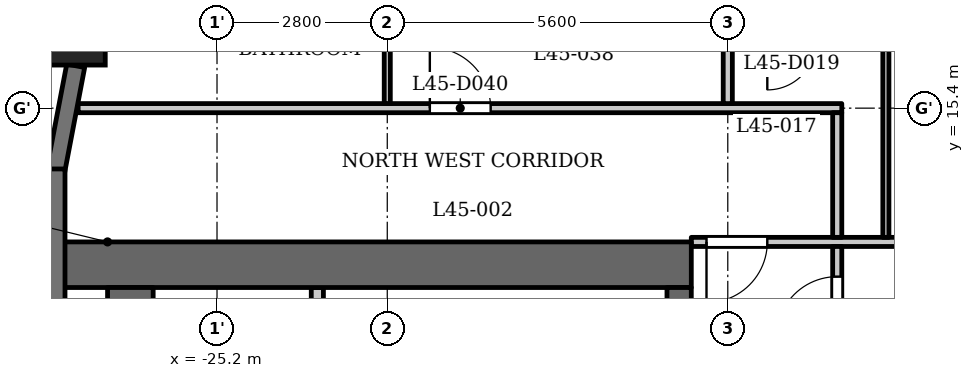
"""IFC4 building model, lengths in metres.
Left out: names, types, materials, properties, quantities, classifications, styles, units other than length and angle.
Written with IfcOpenShell. Run it as: python <this file> out.ifc"""

import sys

from ifc_helpers import new_model, si_unit, direction, frame, frame_2d, origin, origin_2d, place, context, subcontext, project, spatial, rectangle, extrude, element, fill, save


model = new_model("IFC4")
c1 = context("Model", 3, precision=1e-05, world=origin(), true_north=direction((0.0, 1.0)))
c2 = subcontext(c1, "Body", "Model", "MODEL_VIEW")
j1 = project(units=[si_unit("LENGTHUNIT", "METRE"), si_unit("PLANEANGLEUNIT", "RADIAN")], contexts=[c1])
p1 = place(None, origin())
s1 = spatial("IfcSite", under=j1, at=p1, CompositionType="ELEMENT")
p2 = place(p1, origin())
s2 = spatial("IfcBuilding", under=s1, at=p2, CompositionType="ELEMENT")
p3 = place(p2, frame((0.0, 0.0, 174.6)))
s3 = spatial("IfcBuildingStorey", under=s2, at=p3, CompositionType="ELEMENT", Elevation=174.6)
p4 = place(p3, frame((-27.538, 16.609, 0.0), z_axis=(0.0, 0.0, 1.0), x_axis=(1.0, 0.0, 0.0)))
e1 = element("IfcColumn", 1, at=p4, inside=s3, PredefinedType="COLUMN", context=c2, shape_type="SweptSolid", body=[
    extrude(rectangle(XDim=1.0, YDim=1.0, at=origin_2d()), origin(), (0.0, 0.0, 1.0), 3.5),
])
p5 = place(p3, frame((-27.524, 16.097, 0.0), z_axis=(0.0, 0.0, 1.0), x_axis=(-0.187259034321, -0.982310569049, 0.0)))
e2 = element("IfcWall", 2, at=p5, inside=s3, PredefinedType="SOLIDWALL", context=c2, shape_type="SweptSolid", body=[
    extrude(rectangle(XDim=1.756, YDim=0.3, at=frame_2d((0.878, 0.0))), origin(), (0.0, 0.0, 1.0), 2.4),
])
p6 = place(p3, frame((-27.85, 14.4, 0.0), z_axis=(0.0, 0.0, 1.0), x_axis=(0.0, -1.0, 0.0)))
e3 = element("IfcWall", 3, at=p6, inside=s3, PredefinedType="SOLIDWALL", context=c2, shape_type="SweptSolid", body=[
    extrude(rectangle(XDim=2.7, YDim=0.3, at=frame_2d((1.35, 0.0))), origin(), (0.0, 0.0, 1.0), 2.4),
])
p7 = place(p3, frame((-17.4, 12.825, 0.0), z_axis=(0.0, 0.0, 1.0), x_axis=(-1.0, 0.0, 0.0)))
e4 = element("IfcWall", 4, at=p7, inside=s3, PredefinedType="SHEAR", context=c2, shape_type="SweptSolid", body=[
    extrude(rectangle(XDim=10.4, YDim=0.75, at=frame_2d((5.2, 0.0))), origin(), (0.0, 0.0, 1.0), 3.15),
])
p8 = place(p3, frame((-17.6, -12.45, 0.0), z_axis=(0.0, 0.0, 1.0), x_axis=(0.0, 1.0, 0.0)))
e5 = element("IfcWall", 5, at=p8, inside=s3, PredefinedType="SHEAR", context=c2, shape_type="SweptSolid", body=[
    extrude(rectangle(XDim=24.9, YDim=0.4, at=frame_2d((12.45, 0.0))), origin(), (0.0, 0.0, 1.0), 3.15),
])
p9 = place(p8, frame((8.65, 0.0, 0.0)))
e6 = element("IfcOpeningElement", 6, at=p9, cuts=e5, PredefinedType="OPENING", context=c2, shape_type="SweptSolid", body=[
    extrude(rectangle(XDim=0.9, YDim=2.1, at=frame_2d((0.45, 1.05))), frame((0.0, 0.21, 0.0), z_axis=(0.0, -1.0, 0.0), x_axis=(1.0, 0.0, 0.0)), (0.0, 0.0, 1.0), 0.42),
])
p10 = place(p8, frame((15.6, 0.0, 0.0)))
e7 = element("IfcOpeningElement", 7, at=p10, cuts=e5, PredefinedType="OPENING", context=c2, shape_type="SweptSolid", body=[
    extrude(rectangle(XDim=1.1, YDim=2.1, at=frame_2d((0.55, 1.05))), frame((0.0, 0.21, 0.0), z_axis=(0.0, -1.0, 0.0), x_axis=(1.0, 0.0, 0.0)), (0.0, 0.0, 1.0), 0.42),
])
p11 = place(p8, frame((18.0, 0.0, 0.0)))
e8 = element("IfcOpeningElement", 8, at=p11, cuts=e5, PredefinedType="OPENING", context=c2, shape_type="SweptSolid", body=[
    extrude(rectangle(XDim=1.1, YDim=2.1, at=frame_2d((0.55, 1.05))), frame((0.0, 0.21, 0.0), z_axis=(0.0, -1.0, 0.0), x_axis=(1.0, 0.0, 0.0)), (0.0, 0.0, 1.0), 0.42),
])
p12 = place(p8, frame((23.025, 0.0, 0.0)))
e9 = element("IfcOpeningElement", 9, at=p12, cuts=e5, PredefinedType="OPENING", context=c2, shape_type="SweptSolid", body=[
    extrude(rectangle(XDim=1.1, YDim=2.1, at=frame_2d((0.55, 1.05))), frame((0.0, 0.21, 0.0), z_axis=(0.0, -1.0, 0.0), x_axis=(1.0, 0.0, 0.0)), (0.0, 0.0, 1.0), 0.42),
])
p13 = place(p8, frame((0.775, 0.0, 0.0)))
e10 = element("IfcOpeningElement", 10, at=p13, cuts=e5, PredefinedType="OPENING", context=c2, shape_type="SweptSolid", body=[
    extrude(rectangle(XDim=1.1, YDim=2.1, at=frame_2d((0.55, 1.05))), frame((0.0, 0.21, 0.0), z_axis=(0.0, -1.0, 0.0), x_axis=(1.0, 0.0, 0.0)), (0.0, 0.0, 1.0), 0.42),
])
p14 = place(p8, frame((12.925, 0.0, 0.0)))
e11 = element("IfcOpeningElement", 11, at=p14, cuts=e5, PredefinedType="OPENING", context=c2, shape_type="SweptSolid", body=[
    extrude(rectangle(XDim=1.8, YDim=2.1, at=frame_2d((0.9, 1.05))), frame((0.0, 0.21, 0.0), z_axis=(0.0, -1.0, 0.0), x_axis=(1.0, 0.0, 0.0)), (0.0, 0.0, 1.0), 0.42),
])
p15 = place(p3, frame((-26.625, -12.45, 0.0), z_axis=(0.0, 0.0, 1.0), x_axis=(0.0, 1.0, 0.0)))
e12 = element("IfcWall", 12, at=p15, inside=s3, PredefinedType="SHEAR", context=c2, shape_type="SweptSolid", body=[
    extrude(rectangle(XDim=24.9, YDim=0.75, at=frame_2d((12.45, 0.0))), origin(), (0.0, 0.0, 1.0), 3.15),
])
p16 = place(p3, frame((-23.55, 9.8, 0.0), z_axis=(0.0, 0.0, 1.0), x_axis=(0.0, 1.0, 0.0)))
e13 = element("IfcWall", 13, at=p16, inside=s3, PredefinedType="PARTITIONING", context=c2, shape_type="SweptSolid", body=[
    extrude(rectangle(XDim=2.65, YDim=0.2, at=frame_2d((1.325, 0.0))), origin(), (0.0, 0.0, 1.0), 3.15),
])
p17 = place(p16, frame((0.875, 0.0, 0.0)))
e14 = element("IfcOpeningElement", 14, at=p17, cuts=e13, PredefinedType="OPENING", context=c2, shape_type="SweptSolid", body=[
    extrude(rectangle(XDim=0.9, YDim=2.1, at=frame_2d((0.45, 1.05))), frame((0.0, 0.11, 0.0), z_axis=(0.0, -1.0, 0.0), x_axis=(1.0, 0.0, 0.0)), (0.0, 0.0, 1.0), 0.22),
])
p18 = place(p3, frame((-17.4, 13.2, 0.0), z_axis=(0.0, 0.0, 1.0), x_axis=(1.0, 0.0, 0.0)))
e15 = element("IfcWall", 15, at=p18, inside=s3, PredefinedType="PARTITIONING", context=c2, shape_type="SweptSolid", body=[
    extrude(rectangle(XDim=34.8, YDim=0.15, at=frame_2d((17.4, 0.0))), origin(), (0.0, 0.0, 1.0), 3.15),
])
p19 = place(p18, frame((0.25, 0.0, 0.0)))
e16 = element("IfcOpeningElement", 16, at=p19, cuts=e15, PredefinedType="OPENING", context=c2, shape_type="SweptSolid", body=[
    extrude(rectangle(XDim=1.0, YDim=2.1, at=frame_2d((0.5, 1.05))), frame((0.0, 0.085, 0.0), z_axis=(0.0, -1.0, 0.0), x_axis=(1.0, 0.0, 0.0)), (0.0, 0.0, 1.0), 0.17),
])
p20 = place(p18, frame((33.65, 0.0, 0.0)))
e17 = element("IfcOpeningElement", 17, at=p20, cuts=e15, PredefinedType="OPENING", context=c2, shape_type="SweptSolid", body=[
    extrude(rectangle(XDim=1.0, YDim=2.1, at=frame_2d((0.5, 1.05))), frame((0.0, 0.085, 0.0), z_axis=(0.0, -1.0, 0.0), x_axis=(1.0, 0.0, 0.0)), (0.0, 0.0, 1.0), 0.17),
])
p21 = place(p18, frame((10.15, 0.0, 0.0)))
e18 = element("IfcOpeningElement", 18, at=p21, cuts=e15, PredefinedType="OPENING", context=c2, shape_type="SweptSolid", body=[
    extrude(rectangle(XDim=1.0, YDim=2.1, at=frame_2d((0.5, 1.05))), frame((0.0, 0.085, 0.0), z_axis=(0.0, -1.0, 0.0), x_axis=(1.0, 0.0, 0.0)), (0.0, 0.0, 1.0), 0.17),
])
p22 = place(p18, frame((15.75, 0.0, 0.0)))
e19 = element("IfcOpeningElement", 19, at=p22, cuts=e15, PredefinedType="OPENING", context=c2, shape_type="SweptSolid", body=[
    extrude(rectangle(XDim=1.0, YDim=2.1, at=frame_2d((0.5, 1.05))), frame((0.0, 0.085, 0.0), z_axis=(0.0, -1.0, 0.0), x_axis=(1.0, 0.0, 0.0)), (0.0, 0.0, 1.0), 0.17),
])
p23 = place(p18, frame((24.95, 0.0, 0.0)))
e20 = element("IfcOpeningElement", 20, at=p23, cuts=e15, PredefinedType="OPENING", context=c2, shape_type="SweptSolid", body=[
    extrude(rectangle(XDim=1.0, YDim=2.1, at=frame_2d((0.5, 1.05))), frame((0.0, 0.085, 0.0), z_axis=(0.0, -1.0, 0.0), x_axis=(1.0, 0.0, 0.0)), (0.0, 0.0, 1.0), 0.17),
])
p24 = place(p18, frame((29.95, 0.0, 0.0)))
e21 = element("IfcOpeningElement", 21, at=p24, cuts=e15, PredefinedType="OPENING", context=c2, shape_type="SweptSolid", body=[
    extrude(rectangle(XDim=1.0, YDim=2.1, at=frame_2d((0.5, 1.05))), frame((0.0, 0.085, 0.0), z_axis=(0.0, -1.0, 0.0), x_axis=(1.0, 0.0, 0.0)), (0.0, 0.0, 1.0), 0.17),
])
p25 = place(p3, frame((-27.484, 15.4, 0.0), z_axis=(0.0, 0.0, 1.0), x_axis=(1.0, 0.0, 0.0)))
e22 = element("IfcWall", 22, at=p25, inside=s3, PredefinedType="PARTITIONING", context=c2, shape_type="SweptSolid", body=[
    extrude(rectangle(XDim=12.559, YDim=0.15, at=frame_2d((6.279, 0.0))), origin(), (0.0, 0.0, 1.0), 3.15),
])
p26 = place(p25, frame((5.784, 0.0, 0.0)))
e23 = element("IfcOpeningElement", 23, at=p26, cuts=e22, PredefinedType="OPENING", context=c2, shape_type="SweptSolid", body=[
    extrude(rectangle(XDim=1.0, YDim=2.1, at=frame_2d((0.5, 1.05))), frame((0.0, 0.085, 0.0), z_axis=(0.0, -1.0, 0.0), x_axis=(1.0, 0.0, 0.0)), (0.0, 0.0, 1.0), 0.17),
])
p27 = place(p3, frame((-22.4, 15.475, 0.0), z_axis=(0.0, 0.0, 1.0), x_axis=(0.0, 1.0, 0.0)))
e24 = element("IfcWall", 24, at=p27, inside=s3, PredefinedType="PARTITIONING", context=c2, shape_type="SweptSolid", body=[
    extrude(rectangle(XDim=2.575, YDim=0.1, at=frame_2d((1.288, 0.0))), origin(), (0.0, 0.0, 1.0), 3.15),
])
p28 = place(p3, frame((-16.8, 15.475, 0.0), z_axis=(0.0, 0.0, 1.0), x_axis=(0.0, 1.0, 0.0)))
e25 = element("IfcWall", 25, at=p28, inside=s3, PredefinedType="PARTITIONING", context=c2, shape_type="SweptSolid", body=[
    extrude(rectangle(XDim=7.405, YDim=0.15, at=frame_2d((3.702, 0.0))), origin(), (0.0, 0.0, 1.0), 3.15),
])
p29 = place(p3, frame((-15.0, 6.769, 0.0), z_axis=(0.0, 0.0, 1.0), x_axis=(0.0, 1.0, 0.0)))
e26 = element("IfcWall", 26, at=p29, inside=s3, PredefinedType="PARTITIONING", context=c2, shape_type="SweptSolid", body=[
    extrude(rectangle(XDim=6.356, YDim=0.15, at=frame_2d((3.178, 0.0))), origin(), (0.0, 0.0, 1.0), 3.15),
])
p30 = place(p29, frame((4.86, 0.0, 0.0)))
e27 = element("IfcOpeningElement", 27, at=p30, cuts=e26, PredefinedType="OPENING", context=c2, shape_type="SweptSolid", body=[
    extrude(rectangle(XDim=1.0, YDim=2.1, at=frame_2d((0.5, 1.05))), frame((0.0, 0.085, 0.0), z_axis=(0.0, -1.0, 0.0), x_axis=(1.0, 0.0, 0.0)), (0.0, 0.0, 1.0), 0.17),
])
p31 = place(p3, frame((-15.0, 13.275, 0.0), z_axis=(0.0, 0.0, 1.0), x_axis=(0.0, 1.0, 0.0)))
e28 = element("IfcWall", 28, at=p31, inside=s3, PredefinedType="PARTITIONING", context=c2, shape_type="SweptSolid", body=[
    extrude(rectangle(XDim=2.05, YDim=0.15, at=frame_2d((1.025, 0.0))), origin(), (0.0, 0.0, 1.0), 3.15),
])
p32 = place(p3, frame((-14.2, 13.275, 0.0), z_axis=(0.0, 0.0, 1.0), x_axis=(0.0, 1.0, 0.0)))
e29 = element("IfcWall", 29, at=p32, inside=s3, PredefinedType="PARTITIONING", context=c2, shape_type="SweptSolid", body=[
    extrude(rectangle(XDim=3.175, YDim=0.1, at=frame_2d((1.587, 0.0))), origin(), (0.0, 0.0, 1.0), 3.15),
])
p33 = place(p30, origin())
e30 = element("IfcDoor", 30, at=p33, inside=s3, OperationType="SINGLE_SWING_RIGHT", PredefinedType="DOOR", context=c2, shape_type="SweptSolid", body=[
    extrude(rectangle(XDim=1.0, YDim=2.1, at=frame_2d((0.5, 1.05))), frame((0.0, 0.025, 0.0), z_axis=(0.0, -1.0, 0.0), x_axis=(1.0, 0.0, 0.0)), (0.0, 0.0, 1.0), 0.05),
])
fill(e27, e30)
p34 = place(p19, origin())
e31 = element("IfcDoor", 31, at=p34, inside=s3, OperationType="SINGLE_SWING_LEFT", PredefinedType="DOOR", context=c2, shape_type="SweptSolid", body=[
    extrude(rectangle(XDim=1.0, YDim=2.1, at=frame_2d((0.5, 1.05))), frame((0.0, 0.025, 0.0), z_axis=(0.0, -1.0, 0.0), x_axis=(1.0, 0.0, 0.0)), (0.0, 0.0, 1.0), 0.05),
])
fill(e16, e31)
p35 = place(p26, origin())
e32 = element("IfcDoor", 32, at=p35, inside=s3, OperationType="SINGLE_SWING_RIGHT", PredefinedType="DOOR", context=c2, shape_type="SweptSolid", body=[
    extrude(rectangle(XDim=1.0, YDim=2.1, at=frame_2d((0.5, 1.05))), frame((0.0, 0.025, 0.0), z_axis=(0.0, -1.0, 0.0), x_axis=(1.0, 0.0, 0.0)), (0.0, 0.0, 1.0), 0.05),
])
fill(e23, e32)
save(model, sys.argv[1])
